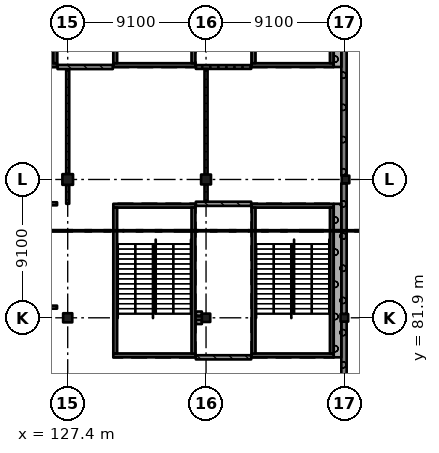
"""IFC4 building model, lengths in metres.
Left out: names, types, materials, properties, quantities, classifications, styles, units other than length and angle.
Written with IfcOpenShell. Run it as: python <this file> out.ifc"""

import sys

from ifc_helpers import new_model, si_unit, direction, frame, frame_2d, origin, origin_2d, place, context, subcontext, project, spatial, rectangle, extrude, element, fill, save


model = new_model("IFC4")
c1 = context("Model", 3, precision=1e-05, world=origin(), true_north=direction((0.0, 1.0)))
c2 = subcontext(c1, "Body", "Model", "MODEL_VIEW")
j1 = project(units=[si_unit("LENGTHUNIT", "METRE"), si_unit("PLANEANGLEUNIT", "RADIAN")], contexts=[c1])
p1 = place(None, origin())
s1 = spatial("IfcSite", under=j1, at=p1, CompositionType="ELEMENT")
p2 = place(p1, origin())
s2 = spatial("IfcBuilding", under=s1, at=p2, CompositionType="ELEMENT")
p3 = place(p2, frame((0.0, 0.0, 15.47)))
s3 = spatial("IfcBuildingStorey", under=s2, at=p3, CompositionType="ELEMENT", Elevation=15.47)
p4 = place(p3, frame((127.4, 81.9, 0.0), z_axis=(0.0, 0.0, 1.0), x_axis=(1.0, 0.0, 0.0)))
e1 = element("IfcColumn", 1, at=p4, inside=s3, PredefinedType="COLUMN", context=c2, shape_type="SweptSolid", body=[
    extrude(rectangle(XDim=0.6, YDim=0.6, at=origin_2d()), origin(), (0.0, 0.0, 1.0), 4.55),
])
p5 = place(p3, frame((127.4, 91.0, 0.0), z_axis=(0.0, 0.0, 1.0), x_axis=(1.0, 0.0, 0.0)))
e2 = element("IfcColumn", 2, at=p5, inside=s3, PredefinedType="COLUMN", context=c2, shape_type="SweptSolid", body=[
    extrude(rectangle(XDim=0.7, YDim=0.7, at=origin_2d()), origin(), (0.0, 0.0, 1.0), 4.55),
])
p6 = place(p3, frame((136.5, 81.9, 0.0), z_axis=(0.0, 0.0, 1.0), x_axis=(1.0, 0.0, 0.0)))
e3 = element("IfcColumn", 3, at=p6, inside=s3, PredefinedType="COLUMN", context=c2, shape_type="SweptSolid", body=[
    extrude(rectangle(XDim=0.55, YDim=0.55, at=origin_2d()), origin(), (0.0, 0.0, 1.0), 4.55),
])
p7 = place(p3, frame((136.5, 91.0, 0.0), z_axis=(0.0, 0.0, 1.0), x_axis=(1.0, 0.0, 0.0)))
e4 = element("IfcColumn", 4, at=p7, inside=s3, PredefinedType="COLUMN", context=c2, shape_type="SweptSolid", body=[
    extrude(rectangle(XDim=0.65, YDim=0.65, at=origin_2d()), origin(), (0.0, 0.0, 1.0), 4.55),
])
for number, where, z_axis, x_axis in (
    (5, (145.6, 81.9, 0.0), (0.0, 0.0, 1.0), (1.0, 0.0, 0.0)),
    (6, (145.675, 91.0, 0.0), (0.0, 0.0, 1.0), (1.0, 0.0, 0.0)),
):
    element("IfcColumn", number, at=place(p3, frame(where, z_axis=z_axis, x_axis=x_axis)), inside=s3, PredefinedType="COLUMN", context=c2, shape_type="SweptSolid", body=[
        extrude(rectangle(XDim=0.5, YDim=0.5, at=origin_2d()), origin(), (0.0, 0.0, 1.0), 4.55),
    ])
p8 = place(p3, frame((144.9, 98.525, 0.0), z_axis=(0.0, 0.0, 1.0), x_axis=(-1.0, 0.0, 0.0)))
e7 = element("IfcWall", 7, at=p8, inside=s3, PredefinedType="SHEAR", context=c2, shape_type="SweptSolid", body=[
    extrude(rectangle(XDim=5.4, YDim=0.25, at=frame_2d((2.7, 0.0))), origin(), (0.0, 0.0, 1.0), 4.55),
])
p9 = place(p8, frame((1.5, 0.0, 0.0)))
e8 = element("IfcOpeningElement", 8, at=p9, cuts=e7, PredefinedType="OPENING", context=c2, shape_type="SweptSolid", body=[
    extrude(rectangle(XDim=2.4, YDim=2.1, at=frame_2d((1.2, 1.05))), frame((0.0, 0.135, 0.0), z_axis=(0.0, -1.0, 0.0), x_axis=(1.0, 0.0, 0.0)), (0.0, 0.0, 1.0), 0.27),
])
for number, where, z_axis, x_axis in (
    (9, (139.625, 108.25, 0.0), (0.0, 0.0, 1.0), (0.0, -1.0, 0.0)),
    (10, (144.775, 108.25, 0.0), (0.0, 0.0, 1.0), (0.0, -1.0, 0.0)),
):
    element("IfcWall", number, at=place(p3, frame(where, z_axis=z_axis, x_axis=x_axis)), inside=s3, PredefinedType="SHEAR", context=c2, shape_type="SweptSolid", body=[
        extrude(rectangle(XDim=9.6, YDim=0.25, at=frame_2d((4.8, 0.0))), origin(), (0.0, 0.0, 1.0), 4.55),
    ])
p10 = place(p3, frame((135.8, 98.525, 0.0), z_axis=(0.0, 0.0, 1.0), x_axis=(-1.0, 0.0, 0.0)))
e11 = element("IfcWall", 11, at=p10, inside=s3, PredefinedType="SHEAR", context=c2, shape_type="SweptSolid", body=[
    extrude(rectangle(XDim=5.4, YDim=0.25, at=frame_2d((2.7, 0.0))), origin(), (0.0, 0.0, 1.0), 4.55),
])
p11 = place(p10, frame((1.5, 0.0, 0.0)))
e12 = element("IfcOpeningElement", 12, at=p11, cuts=e11, PredefinedType="OPENING", context=c2, shape_type="SweptSolid", body=[
    extrude(rectangle(XDim=2.4, YDim=2.1, at=frame_2d((1.2, 1.05))), frame((0.0, 0.135, 0.0), z_axis=(0.0, -1.0, 0.0), x_axis=(1.0, 0.0, 0.0)), (0.0, 0.0, 1.0), 0.27),
])
for number, where, z_axis, x_axis in (
    (13, (130.525, 108.25, 0.0), (0.0, 0.0, 1.0), (0.0, -1.0, 0.0)),
    (14, (135.675, 108.25, 0.0), (0.0, 0.0, 1.0), (0.0, -1.0, 0.0)),
):
    element("IfcWall", number, at=place(p3, frame(where, z_axis=z_axis, x_axis=x_axis)), inside=s3, PredefinedType="SHEAR", context=c2, shape_type="SweptSolid", body=[
        extrude(rectangle(XDim=9.6, YDim=0.25, at=frame_2d((4.8, 0.0))), origin(), (0.0, 0.0, 1.0), 4.55),
    ])
p12 = place(p3, frame((126.7, 98.525, 0.0), z_axis=(0.0, 0.0, 1.0), x_axis=(-1.0, 0.0, 0.0)))
e15 = element("IfcWall", 15, at=p12, inside=s3, PredefinedType="SHEAR", context=c2, shape_type="SweptSolid", body=[
    extrude(rectangle(XDim=5.4, YDim=0.25, at=frame_2d((2.7, 0.0))), origin(), (0.0, 0.0, 1.0), 4.55),
])
p13 = place(p12, frame((1.5, 0.0, 0.0)))
e16 = element("IfcOpeningElement", 16, at=p13, cuts=e15, PredefinedType="OPENING", context=c2, shape_type="SweptSolid", body=[
    extrude(rectangle(XDim=2.4, YDim=2.1, at=frame_2d((1.2, 1.05))), frame((0.0, 0.135, 0.0), z_axis=(0.0, -1.0, 0.0), x_axis=(1.0, 0.0, 0.0)), (0.0, 0.0, 1.0), 0.27),
])
p14 = place(p3, frame((126.575, 108.25, 0.0), z_axis=(0.0, 0.0, 1.0), x_axis=(0.0, -1.0, 0.0)))
e17 = element("IfcWall", 17, at=p14, inside=s3, PredefinedType="SHEAR", context=c2, shape_type="SweptSolid", body=[
    extrude(rectangle(XDim=9.6, YDim=0.25, at=frame_2d((4.8, 0.0))), origin(), (0.0, 0.0, 1.0), 4.55),
])
p15 = place(p3, frame((144.9, 79.425, 0.0), z_axis=(0.0, 0.0, 1.0), x_axis=(-1.0, 0.0, 0.0)))
e18 = element("IfcWall", 18, at=p15, inside=s3, PredefinedType="SHEAR", context=c2, shape_type="SweptSolid", body=[
    extrude(rectangle(XDim=5.4, YDim=0.25, at=frame_2d((2.7, 0.0))), origin(), (0.0, 0.0, 1.0), 4.55),
])
p16 = place(p3, frame((144.9, 89.275, 0.0), z_axis=(0.0, 0.0, 1.0), x_axis=(-1.0, 0.0, 0.0)))
e19 = element("IfcWall", 19, at=p16, inside=s3, PredefinedType="SHEAR", context=c2, shape_type="SweptSolid", body=[
    extrude(rectangle(XDim=5.4, YDim=0.25, at=frame_2d((2.7, 0.0))), origin(), (0.0, 0.0, 1.0), 4.55),
])
p17 = place(p16, frame((1.5, 0.0, 0.0)))
e20 = element("IfcOpeningElement", 20, at=p17, cuts=e19, PredefinedType="OPENING", context=c2, shape_type="SweptSolid", body=[
    extrude(rectangle(XDim=2.4, YDim=2.1, at=frame_2d((1.2, 1.05))), frame((0.0, 0.135, 0.0), z_axis=(0.0, -1.0, 0.0), x_axis=(1.0, 0.0, 0.0)), (0.0, 0.0, 1.0), 0.27),
])
for number, where, z_axis, x_axis in (
    (21, (139.625, 89.15, 0.0), (0.0, 0.0, 1.0), (0.0, -1.0, 0.0)),
    (22, (144.775, 89.15, 0.0), (0.0, 0.0, 1.0), (0.0, -1.0, 0.0)),
):
    element("IfcWall", number, at=place(p3, frame(where, z_axis=z_axis, x_axis=x_axis)), inside=s3, PredefinedType="SHEAR", context=c2, shape_type="SweptSolid", body=[
        extrude(rectangle(XDim=9.6, YDim=0.25, at=frame_2d((4.8, 0.0))), origin(), (0.0, 0.0, 1.0), 4.55),
    ])
p18 = place(p3, frame((135.8, 79.425, 0.0), z_axis=(0.0, 0.0, 1.0), x_axis=(-1.0, 0.0, 0.0)))
e23 = element("IfcWall", 23, at=p18, inside=s3, PredefinedType="SHEAR", context=c2, shape_type="SweptSolid", body=[
    extrude(rectangle(XDim=5.4, YDim=0.25, at=frame_2d((2.7, 0.0))), origin(), (0.0, 0.0, 1.0), 4.55),
])
p19 = place(p3, frame((135.8, 89.275, 0.0), z_axis=(0.0, 0.0, 1.0), x_axis=(-1.0, 0.0, 0.0)))
e24 = element("IfcWall", 24, at=p19, inside=s3, PredefinedType="SHEAR", context=c2, shape_type="SweptSolid", body=[
    extrude(rectangle(XDim=5.4, YDim=0.25, at=frame_2d((2.7, 0.0))), origin(), (0.0, 0.0, 1.0), 4.55),
])
p20 = place(p19, frame((1.5, 0.0, 0.0)))
e25 = element("IfcOpeningElement", 25, at=p20, cuts=e24, PredefinedType="OPENING", context=c2, shape_type="SweptSolid", body=[
    extrude(rectangle(XDim=2.4, YDim=2.1, at=frame_2d((1.2, 1.05))), frame((0.0, 0.135, 0.0), z_axis=(0.0, -1.0, 0.0), x_axis=(1.0, 0.0, 0.0)), (0.0, 0.0, 1.0), 0.27),
])
for number, where, z_axis, x_axis in (
    (26, (130.525, 89.15, 0.0), (0.0, 0.0, 1.0), (0.0, -1.0, 0.0)),
    (27, (135.675, 89.15, 0.0), (0.0, 0.0, 1.0), (0.0, -1.0, 0.0)),
):
    element("IfcWall", number, at=place(p3, frame(where, z_axis=z_axis, x_axis=x_axis)), inside=s3, PredefinedType="SHEAR", context=c2, shape_type="SweptSolid", body=[
        extrude(rectangle(XDim=9.6, YDim=0.25, at=frame_2d((4.8, 0.0))), origin(), (0.0, 0.0, 1.0), 4.55),
    ])
p21 = place(p3, frame((145.575, 73.075, 0.0), z_axis=(0.0, 0.0, 1.0), x_axis=(0.0, 1.0, 0.0)))
e28 = element("IfcWall", 28, at=p21, inside=s3, PredefinedType="SOLIDWALL", context=c2, shape_type="SweptSolid", body=[
    extrude(rectangle(XDim=8.575, YDim=0.35, at=frame_2d((4.288, 0.0))), origin(), (0.0, 0.0, 1.0), 3.55),
])
for number, where, z_axis, x_axis in (
    (29, (145.575, 82.15, 0.0), (0.0, 0.0, 1.0), (0.0, 1.0, 0.0)),
    (30, (145.575, 91.25, 0.0), (0.0, 0.0, 1.0), (0.0, 1.0, 0.0)),
):
    element("IfcWall", number, at=place(p3, frame(where, z_axis=z_axis, x_axis=x_axis)), inside=s3, PredefinedType="SOLIDWALL", context=c2, shape_type="SweptSolid", body=[
        extrude(rectangle(XDim=8.6, YDim=0.35, at=frame_2d((4.3, 0.0))), origin(), (0.0, 0.0, 1.0), 3.55),
    ])
p22 = place(p3, frame((145.15, 98.4, 0.0), z_axis=(0.0, 0.0, 1.0), x_axis=(0.0, 1.0, 0.0)))
e31 = element("IfcWall", 31, at=p22, inside=s3, PredefinedType="SOLIDWALL", context=c2, shape_type="SweptSolid", body=[
    extrude(rectangle(XDim=10.1, YDim=0.5, at=frame_2d((5.05, 0.0))), origin(), (0.0, 0.0, 1.0), 4.55),
])
p23 = place(p3, frame((145.15, 79.3, 0.0), z_axis=(0.0, 0.0, 1.0), x_axis=(0.0, 1.0, 0.0)))
e32 = element("IfcWall", 32, at=p23, inside=s3, PredefinedType="SOLIDWALL", context=c2, shape_type="SweptSolid", body=[
    extrude(rectangle(XDim=10.1, YDim=0.5, at=frame_2d((5.05, 0.0))), origin(), (0.0, 0.0, 1.0), 4.55),
])
p24 = place(p3, frame((126.7, 82.6, 0.0), z_axis=(0.0, 0.0, 1.0), x_axis=(-1.0, 0.0, 0.0)))
e33 = element("IfcWall", 33, at=p24, inside=s3, PredefinedType="PARTITIONING", context=c2, shape_type="SweptSolid", body=[
    extrude(rectangle(XDim=0.57, YDim=0.2, at=frame_2d((0.285, 0.0))), origin(), (0.0, 0.0, 1.0), 4.3),
])
p25 = place(p3, frame((126.7, 89.4, 0.0), z_axis=(0.0, 0.0, 1.0), x_axis=(-1.0, 0.0, 0.0)))
e34 = element("IfcWall", 34, at=p25, inside=s3, PredefinedType="PARTITIONING", context=c2, shape_type="SweptSolid", body=[
    extrude(rectangle(XDim=5.4, YDim=0.2, at=frame_2d((2.7, 0.0))), origin(), (0.0, 0.0, 1.0), 4.3),
])
p26 = place(p25, frame((1.85, 0.0, 0.0)))
e35 = element("IfcOpeningElement", 35, at=p26, cuts=e34, PredefinedType="OPENING", context=c2, shape_type="SweptSolid", body=[
    extrude(rectangle(XDim=1.8, YDim=2.4, at=frame_2d((0.9, 1.2))), frame((0.0, 0.11, 0.0), z_axis=(0.0, -1.0, 0.0), x_axis=(1.0, 0.0, 0.0)), (0.0, 0.0, 1.0), 0.22),
])
p27 = place(p3, frame((126.73, 98.4, 0.0), z_axis=(0.0, 0.0, 1.0), x_axis=(1.0, 0.0, 0.0)))
e36 = element("IfcWall", 36, at=p27, inside=s3, PredefinedType="SOLIDWALL", context=c2, shape_type="SweptSolid", body=[
    extrude(rectangle(XDim=3.64, YDim=0.275, at=frame_2d((1.82, 0.0))), origin(), (0.0, 0.0, 1.0), 4.3),
])
p28 = place(p27, frame((1.52, 0.0, 0.0)))
e37 = element("IfcOpeningElement", 37, at=p28, cuts=e36, PredefinedType="OPENING", context=c2, shape_type="SweptSolid", body=[
    extrude(rectangle(XDim=1.2, YDim=2.4, at=frame_2d((0.6, 1.2))), frame((0.0, 0.147, 0.0), z_axis=(0.0, -1.0, 0.0), x_axis=(1.0, 0.0, 0.0)), (0.0, 0.0, 1.0), 0.295),
])
p29 = place(p3, frame((127.4, 89.4, 0.0), z_axis=(0.0, 0.0, 1.0), x_axis=(0.0, 1.0, 0.0)))
e38 = element("IfcWall", 38, at=p29, inside=s3, PredefinedType="PARTITIONING", context=c2, shape_type="SweptSolid", body=[
    extrude(rectangle(XDim=1.25, YDim=0.2, at=frame_2d((0.625, 0.0))), origin(), (0.0, 0.0, 1.0), 3.55),
])
p30 = place(p3, frame((127.4, 91.35, 0.0), z_axis=(0.0, 0.0, 1.0), x_axis=(0.0, 1.0, 0.0)))
e39 = element("IfcWall", 39, at=p30, inside=s3, PredefinedType="PARTITIONING", context=c2, shape_type="SweptSolid", body=[
    extrude(rectangle(XDim=6.912, YDim=0.2, at=frame_2d((3.456, 0.0))), origin(), (0.0, 0.0, 1.0), 3.55),
])
p31 = place(p30, frame((0.85, 0.0, 0.0)))
e40 = element("IfcOpeningElement", 40, at=p31, cuts=e39, PredefinedType="OPENING", context=c2, shape_type="SweptSolid", body=[
    extrude(rectangle(XDim=1.8, YDim=2.4, at=frame_2d((0.9, 1.2))), frame((0.0, 0.11, 0.0), z_axis=(0.0, -1.0, 0.0), x_axis=(1.0, 0.0, 0.0)), (0.0, 0.0, 1.0), 0.22),
])
p32 = place(p30, frame((4.25, 0.0, 0.0)))
e41 = element("IfcOpeningElement", 41, at=p32, cuts=e39, PredefinedType="OPENING", context=c2, shape_type="SweptSolid", body=[
    extrude(rectangle(XDim=1.8, YDim=2.4, at=frame_2d((0.9, 1.2))), frame((0.0, 0.11, 0.0), z_axis=(0.0, -1.0, 0.0), x_axis=(1.0, 0.0, 0.0)), (0.0, 0.0, 1.0), 0.22),
])
p33 = place(p3, frame((135.83, 81.625, 0.0), z_axis=(0.0, 0.0, 1.0), x_axis=(1.0, 0.0, 0.0)))
e42 = element("IfcWall", 42, at=p33, inside=s3, PredefinedType="SOLIDWALL", context=c2, shape_type="SweptSolid", body=[
    extrude(rectangle(XDim=0.395, YDim=0.275, at=frame_2d((0.198, 0.0))), origin(), (0.0, 0.0, 1.0), 4.3),
])
p34 = place(p3, frame((135.83, 98.4, 0.0), z_axis=(0.0, 0.0, 1.0), x_axis=(1.0, 0.0, 0.0)))
e43 = element("IfcWall", 43, at=p34, inside=s3, PredefinedType="SOLIDWALL", context=c2, shape_type="SweptSolid", body=[
    extrude(rectangle(XDim=3.64, YDim=0.25, at=frame_2d((1.82, 0.0))), origin(), (0.0, 0.0, 1.0), 4.3),
])
p35 = place(p34, frame((1.62, 0.0, 0.0)))
e44 = element("IfcOpeningElement", 44, at=p35, cuts=e43, PredefinedType="OPENING", context=c2, shape_type="SweptSolid", body=[
    extrude(rectangle(XDim=1.0, YDim=2.1, at=frame_2d((0.5, 1.05))), frame((0.0, 0.135, 0.0), z_axis=(0.0, -1.0, 0.0), x_axis=(1.0, 0.0, 0.0)), (0.0, 0.0, 1.0), 0.27),
])
p36 = place(p3, frame((136.225, 82.175, 0.0), z_axis=(0.0, 0.0, 1.0), x_axis=(-1.0, 0.0, 0.0)))
e45 = element("IfcWall", 45, at=p36, inside=s3, PredefinedType="SOLIDWALL", context=c2, shape_type="SweptSolid", body=[
    extrude(rectangle(XDim=0.395, YDim=0.275, at=frame_2d((0.198, 0.0))), origin(), (0.0, 0.0, 1.0), 4.3),
])
p37 = place(p3, frame((135.83, 89.4, 0.0), z_axis=(0.0, 0.0, 1.0), x_axis=(1.0, 0.0, 0.0)))
e46 = element("IfcWall", 46, at=p37, inside=s3, PredefinedType="SOLIDWALL", context=c2, shape_type="SweptSolid", body=[
    extrude(rectangle(XDim=3.64, YDim=0.275, at=frame_2d((1.82, 0.0))), origin(), (0.0, 0.0, 1.0), 4.3),
])
p38 = place(p37, frame((1.59, 0.0, 0.0)))
e47 = element("IfcOpeningElement", 47, at=p38, cuts=e46, PredefinedType="OPENING", context=c2, shape_type="SweptSolid", body=[
    extrude(rectangle(XDim=1.2, YDim=2.4, at=frame_2d((0.6, 1.2))), frame((0.0, 0.147, 0.0), z_axis=(0.0, -1.0, 0.0), x_axis=(1.0, 0.0, 0.0)), (0.0, 0.0, 1.0), 0.295),
])
p39 = place(p3, frame((136.5, 89.538, 0.0), z_axis=(0.0, 0.0, 1.0), x_axis=(0.0, 1.0, 0.0)))
e48 = element("IfcWall", 48, at=p39, inside=s3, PredefinedType="PARTITIONING", context=c2, shape_type="SweptSolid", body=[
    extrude(rectangle(XDim=1.137, YDim=0.2, at=frame_2d((0.569, 0.0))), origin(), (0.0, 0.0, 1.0), 3.55),
])
p40 = place(p3, frame((136.5, 91.325, 0.0), z_axis=(0.0, 0.0, 1.0), x_axis=(0.0, 1.0, 0.0)))
e49 = element("IfcWall", 49, at=p40, inside=s3, PredefinedType="PARTITIONING", context=c2, shape_type="SweptSolid", body=[
    extrude(rectangle(XDim=6.95, YDim=0.2, at=frame_2d((3.475, 0.0))), origin(), (0.0, 0.0, 1.0), 3.55),
])
p41 = place(p40, frame((0.85, 0.0, 0.0)))
e50 = element("IfcOpeningElement", 50, at=p41, cuts=e49, PredefinedType="OPENING", context=c2, shape_type="SweptSolid", body=[
    extrude(rectangle(XDim=1.8, YDim=2.4, at=frame_2d((0.9, 1.2))), frame((0.0, 0.11, 0.0), z_axis=(0.0, -1.0, 0.0), x_axis=(1.0, 0.0, 0.0)), (0.0, 0.0, 1.0), 0.22),
])
p42 = place(p40, frame((4.35, 0.0, 0.0)))
e51 = element("IfcOpeningElement", 51, at=p42, cuts=e49, PredefinedType="OPENING", context=c2, shape_type="SweptSolid", body=[
    extrude(rectangle(XDim=1.8, YDim=2.4, at=frame_2d((0.9, 1.2))), frame((0.0, 0.11, 0.0), z_axis=(0.0, -1.0, 0.0), x_axis=(1.0, 0.0, 0.0)), (0.0, 0.0, 1.0), 0.22),
])
p43 = place(p3, frame((139.47, 79.3, 0.0), z_axis=(0.0, 0.0, 1.0), x_axis=(-1.0, 0.0, 0.0)))
e52 = element("IfcWall", 52, at=p43, inside=s3, PredefinedType="SOLIDWALL", context=c2, shape_type="SweptSolid", body=[
    extrude(rectangle(XDim=3.64, YDim=0.275, at=frame_2d((1.82, 0.0))), origin(), (0.0, 0.0, 1.0), 4.3),
])
p44 = place(p38, origin())
e53 = element("IfcDoor", 53, at=p44, inside=s3, OperationType="SINGLE_SWING_RIGHT", PredefinedType="DOOR", context=c2, shape_type="SweptSolid", body=[
    extrude(rectangle(XDim=1.2, YDim=2.4, at=frame_2d((0.6, 1.2))), frame((0.0, 0.025, 0.0), z_axis=(0.0, -1.0, 0.0), x_axis=(1.0, 0.0, 0.0)), (0.0, 0.0, 1.0), 0.05),
])
fill(e47, e53)
p45 = place(p35, origin())
e54 = element("IfcDoor", 54, at=p45, inside=s3, OperationType="SINGLE_SWING_RIGHT", PredefinedType="DOOR", context=c2, shape_type="SweptSolid", body=[
    extrude(rectangle(XDim=1.0, YDim=2.1, at=frame_2d((0.5, 1.05))), frame((0.0, 0.025, 0.0), z_axis=(0.0, -1.0, 0.0), x_axis=(1.0, 0.0, 0.0)), (0.0, 0.0, 1.0), 0.05),
])
fill(e44, e54)
p46 = place(p28, origin())
e55 = element("IfcDoor", 55, at=p46, inside=s3, OperationType="SINGLE_SWING_RIGHT", PredefinedType="DOOR", context=c2, shape_type="SweptSolid", body=[
    extrude(rectangle(XDim=1.2, YDim=2.4, at=frame_2d((0.6, 1.2))), frame((0.0, 0.025, 0.0), z_axis=(0.0, -1.0, 0.0), x_axis=(1.0, 0.0, 0.0)), (0.0, 0.0, 1.0), 0.05),
])
fill(e37, e55)
p47 = place(p41, origin())
e56 = element("IfcDoor", 56, at=p47, inside=s3, OperationType="DOUBLE_DOOR_SINGLE_SWING", PredefinedType="DOOR", context=c2, shape_type="SweptSolid", body=[
    extrude(rectangle(XDim=1.8, YDim=2.4, at=frame_2d((0.9, 1.2))), frame((0.0, 0.025, 0.0), z_axis=(0.0, -1.0, 0.0), x_axis=(1.0, 0.0, 0.0)), (0.0, 0.0, 1.0), 0.05),
])
fill(e50, e56)
p48 = place(p42, origin())
e57 = element("IfcDoor", 57, at=p48, inside=s3, OperationType="DOUBLE_DOOR_SINGLE_SWING", PredefinedType="DOOR", context=c2, shape_type="SweptSolid", body=[
    extrude(rectangle(XDim=1.8, YDim=2.4, at=frame_2d((0.9, 1.2))), frame((0.0, 0.025, 0.0), z_axis=(0.0, -1.0, 0.0), x_axis=(1.0, 0.0, 0.0)), (0.0, 0.0, 1.0), 0.05),
])
fill(e51, e57)
p49 = place(p31, origin())
e58 = element("IfcDoor", 58, at=p49, inside=s3, OperationType="DOUBLE_DOOR_SINGLE_SWING", PredefinedType="DOOR", context=c2, shape_type="SweptSolid", body=[
    extrude(rectangle(XDim=1.8, YDim=2.4, at=frame_2d((0.9, 1.2))), frame((0.0, 0.025, 0.0), z_axis=(0.0, -1.0, 0.0), x_axis=(1.0, 0.0, 0.0)), (0.0, 0.0, 1.0), 0.05),
])
fill(e40, e58)
p50 = place(p32, origin())
e59 = element("IfcDoor", 59, at=p50, inside=s3, OperationType="DOUBLE_DOOR_SINGLE_SWING", PredefinedType="DOOR", context=c2, shape_type="SweptSolid", body=[
    extrude(rectangle(XDim=1.8, YDim=2.4, at=frame_2d((0.9, 1.2))), frame((0.0, 0.025, 0.0), z_axis=(0.0, -1.0, 0.0), x_axis=(1.0, 0.0, 0.0)), (0.0, 0.0, 1.0), 0.05),
])
fill(e41, e59)
p51 = place(p9, origin())
e60 = element("IfcDoor", 60, at=p51, inside=s3, OperationType="DOUBLE_DOOR_SINGLE_SWING", PredefinedType="DOOR", context=c2, shape_type="SweptSolid", body=[
    extrude(rectangle(XDim=2.4, YDim=2.1, at=frame_2d((1.2, 1.05))), frame((0.0, 0.025, 0.0), z_axis=(0.0, -1.0, 0.0), x_axis=(1.0, 0.0, 0.0)), (0.0, 0.0, 1.0), 0.05),
])
fill(e8, e60)
p52 = place(p11, origin())
e61 = element("IfcDoor", 61, at=p52, inside=s3, OperationType="DOUBLE_DOOR_SINGLE_SWING", PredefinedType="DOOR", context=c2, shape_type="SweptSolid", body=[
    extrude(rectangle(XDim=2.4, YDim=2.1, at=frame_2d((1.2, 1.05))), frame((0.0, 0.025, 0.0), z_axis=(0.0, -1.0, 0.0), x_axis=(1.0, 0.0, 0.0)), (0.0, 0.0, 1.0), 0.05),
])
fill(e12, e61)
p53 = place(p17, origin())
e62 = element("IfcDoor", 62, at=p53, inside=s3, OperationType="DOUBLE_DOOR_SINGLE_SWING", PredefinedType="DOOR", context=c2, shape_type="SweptSolid", body=[
    extrude(rectangle(XDim=2.4, YDim=2.1, at=frame_2d((1.2, 1.05))), frame((0.0, 0.025, 0.0), z_axis=(0.0, -1.0, 0.0), x_axis=(1.0, 0.0, 0.0)), (0.0, 0.0, 1.0), 0.05),
])
fill(e20, e62)
p54 = place(p20, origin())
e63 = element("IfcDoor", 63, at=p54, inside=s3, OperationType="DOUBLE_DOOR_SINGLE_SWING", PredefinedType="DOOR", context=c2, shape_type="SweptSolid", body=[
    extrude(rectangle(XDim=2.4, YDim=2.1, at=frame_2d((1.2, 1.05))), frame((0.0, 0.025, 0.0), z_axis=(0.0, -1.0, 0.0), x_axis=(1.0, 0.0, 0.0)), (0.0, 0.0, 1.0), 0.05),
])
fill(e25, e63)
save(model, sys.argv[1])
